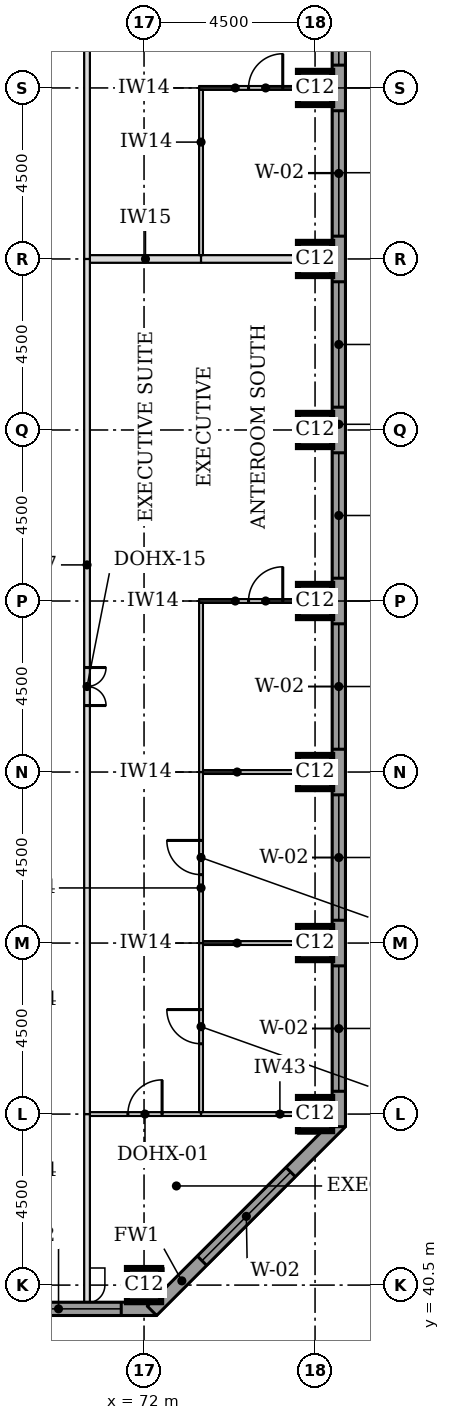
"""IFC4 building model, lengths in metres.
Left out: names, types, materials, properties, quantities, classifications, styles, units other than length and angle.
Written with IfcOpenShell. Run it as: python <this file> out.ifc"""

import sys

from ifc_helpers import new_model, si_unit, direction, frame, frame_2d, origin, origin_2d, place, context, subcontext, project, spatial, rectangle, extrude, element, fill, save


model = new_model("IFC4")
c1 = context("Model", 3, precision=1e-05, world=origin(), true_north=direction((0.0, 1.0)))
c2 = subcontext(c1, "Body", "Model", "MODEL_VIEW")
j1 = project(units=[si_unit("LENGTHUNIT", "METRE"), si_unit("PLANEANGLEUNIT", "RADIAN")], contexts=[c1])
p1 = place(None, origin())
s1 = spatial("IfcSite", under=j1, at=p1, CompositionType="ELEMENT")
p2 = place(p1, origin())
s2 = spatial("IfcBuilding", under=s1, at=p2, CompositionType="ELEMENT")
p3 = place(p2, frame((0.0, 0.0, 256.3)))
s3 = spatial("IfcBuildingStorey", under=s2, at=p3, CompositionType="ELEMENT", Elevation=256.3)
for number, where, z_axis, x_axis in (
    (1, (72.0, 40.5, 0.0), (0.0, 0.0, 1.0), (1.0, 0.0, 0.0)),
    (2, (76.5, 45.0, 0.0), (0.0, 0.0, 1.0), (1.0, 0.0, 0.0)),
    (3, (76.5, 49.5, 0.0), (0.0, 0.0, 1.0), (1.0, 0.0, 0.0)),
    (4, (76.5, 54.0, 0.0), (0.0, 0.0, 1.0), (1.0, 0.0, 0.0)),
    (5, (76.5, 58.5, 0.0), (0.0, 0.0, 1.0), (1.0, 0.0, 0.0)),
    (6, (76.5, 63.0, 0.0), (0.0, 0.0, 1.0), (1.0, 0.0, 0.0)),
    (7, (76.5, 67.5, 0.0), (0.0, 0.0, 1.0), (1.0, 0.0, 0.0)),
    (8, (76.5, 72.0, 0.0), (0.0, 0.0, 1.0), (1.0, 0.0, 0.0)),
):
    element("IfcColumn", number, at=place(p3, frame(where, z_axis=z_axis, x_axis=x_axis)), inside=s3, PredefinedType="COLUMN", context=c2, shape_type="SweptSolid", body=[
        extrude(rectangle(XDim=0.9, YDim=0.9, at=origin_2d()), origin(), (0.0, 0.0, 1.0), 3.7),
    ])
p4 = place(p3, frame((36.0, 39.875, 0.0), z_axis=(0.0, 0.0, 1.0), x_axis=(1.0, 0.0, 0.0)))
e9 = element("IfcWall", 9, at=p4, inside=s3, PredefinedType="STANDARD", context=c2, shape_type="SweptSolid", body=[
    extrude(rectangle(XDim=36.331, YDim=0.35, at=frame_2d((18.166, 0.0))), origin(), (0.0, 0.0, 1.0), 3.525),
])
p5 = place(p4, frame((0.6, 0.0, 0.9)))
e10 = element("IfcOpeningElement", 10, at=p5, cuts=e9, PredefinedType="OPENING", context=c2, shape_type="SweptSolid", body=[
    extrude(rectangle(XDim=3.3, YDim=1.9, at=frame_2d((1.65, 0.95))), frame((0.0, 0.185, 0.0), z_axis=(0.0, -1.0, 0.0), x_axis=(1.0, 0.0, 0.0)), (0.0, 0.0, 1.0), 0.37),
])
p6 = place(p4, frame((5.1, 0.0, 0.9)))
e11 = element("IfcOpeningElement", 11, at=p6, cuts=e9, PredefinedType="OPENING", context=c2, shape_type="SweptSolid", body=[
    extrude(rectangle(XDim=3.3, YDim=1.9, at=frame_2d((1.65, 0.95))), frame((0.0, 0.185, 0.0), z_axis=(0.0, -1.0, 0.0), x_axis=(1.0, 0.0, 0.0)), (0.0, 0.0, 1.0), 0.37),
])
p7 = place(p4, frame((9.6, 0.0, 0.9)))
e12 = element("IfcOpeningElement", 12, at=p7, cuts=e9, PredefinedType="OPENING", context=c2, shape_type="SweptSolid", body=[
    extrude(rectangle(XDim=3.3, YDim=1.9, at=frame_2d((1.65, 0.95))), frame((0.0, 0.185, 0.0), z_axis=(0.0, -1.0, 0.0), x_axis=(1.0, 0.0, 0.0)), (0.0, 0.0, 1.0), 0.37),
])
p8 = place(p4, frame((14.1, 0.0, 0.9)))
e13 = element("IfcOpeningElement", 13, at=p8, cuts=e9, PredefinedType="OPENING", context=c2, shape_type="SweptSolid", body=[
    extrude(rectangle(XDim=3.3, YDim=1.9, at=frame_2d((1.65, 0.95))), frame((0.0, 0.185, 0.0), z_axis=(0.0, -1.0, 0.0), x_axis=(1.0, 0.0, 0.0)), (0.0, 0.0, 1.0), 0.37),
])
p9 = place(p4, frame((18.6, 0.0, 0.9)))
e14 = element("IfcOpeningElement", 14, at=p9, cuts=e9, PredefinedType="OPENING", context=c2, shape_type="SweptSolid", body=[
    extrude(rectangle(XDim=3.3, YDim=1.9, at=frame_2d((1.65, 0.95))), frame((0.0, 0.185, 0.0), z_axis=(0.0, -1.0, 0.0), x_axis=(1.0, 0.0, 0.0)), (0.0, 0.0, 1.0), 0.37),
])
p10 = place(p4, frame((23.1, 0.0, 0.9)))
e15 = element("IfcOpeningElement", 15, at=p10, cuts=e9, PredefinedType="OPENING", context=c2, shape_type="SweptSolid", body=[
    extrude(rectangle(XDim=3.3, YDim=1.9, at=frame_2d((1.65, 0.95))), frame((0.0, 0.185, 0.0), z_axis=(0.0, -1.0, 0.0), x_axis=(1.0, 0.0, 0.0)), (0.0, 0.0, 1.0), 0.37),
])
p11 = place(p4, frame((27.6, 0.0, 0.9)))
e16 = element("IfcOpeningElement", 16, at=p11, cuts=e9, PredefinedType="OPENING", context=c2, shape_type="SweptSolid", body=[
    extrude(rectangle(XDim=3.3, YDim=1.9, at=frame_2d((1.65, 0.95))), frame((0.0, 0.185, 0.0), z_axis=(0.0, -1.0, 0.0), x_axis=(1.0, 0.0, 0.0)), (0.0, 0.0, 1.0), 0.37),
])
p12 = place(p4, frame((32.1, 0.0, 0.9)))
e17 = element("IfcOpeningElement", 17, at=p12, cuts=e9, PredefinedType="OPENING", context=c2, shape_type="SweptSolid", body=[
    extrude(rectangle(XDim=3.3, YDim=1.9, at=frame_2d((1.65, 0.95))), frame((0.0, 0.185, 0.0), z_axis=(0.0, -1.0, 0.0), x_axis=(1.0, 0.0, 0.0)), (0.0, 0.0, 1.0), 0.37),
])
p13 = place(p3, frame((72.208, 39.824, 0.0), z_axis=(0.0, 0.0, 1.0), x_axis=(0.707106781187, 0.707106781187, 0.0)))
e18 = element("IfcWall", 18, at=p13, inside=s3, PredefinedType="STANDARD", context=c2, shape_type="SweptSolid", body=[
    extrude(rectangle(XDim=7.027, YDim=0.35, at=frame_2d((3.513, 0.0))), origin(), (0.0, 0.0, 1.0), 3.525),
])
p14 = place(p13, frame((1.863, 0.0, 0.9)))
e19 = element("IfcOpeningElement", 19, at=p14, cuts=e18, PredefinedType="OPENING", context=c2, shape_type="SweptSolid", body=[
    extrude(rectangle(XDim=3.3, YDim=1.9, at=frame_2d((1.65, 0.95))), frame((0.0, 0.185, 0.0), z_axis=(0.0, -1.0, 0.0), x_axis=(1.0, 0.0, 0.0)), (0.0, 0.0, 1.0), 0.37),
])
p15 = place(p3, frame((77.125, 44.669, 0.0), z_axis=(0.0, 0.0, 1.0), x_axis=(0.0, 1.0, 0.0)))
e20 = element("IfcWall", 20, at=p15, inside=s3, PredefinedType="STANDARD", context=c2, shape_type="SweptSolid", body=[
    extrude(rectangle(XDim=32.163, YDim=0.35, at=frame_2d((16.081, 0.0))), origin(), (0.0, 0.0, 1.0), 3.525),
])
p16 = place(p15, frame((0.931, 0.0, 0.9)))
e21 = element("IfcOpeningElement", 21, at=p16, cuts=e20, PredefinedType="OPENING", context=c2, shape_type="SweptSolid", body=[
    extrude(rectangle(XDim=3.3, YDim=1.9, at=frame_2d((1.65, 0.95))), frame((0.0, 0.185, 0.0), z_axis=(0.0, -1.0, 0.0), x_axis=(1.0, 0.0, 0.0)), (0.0, 0.0, 1.0), 0.37),
])
p17 = place(p15, frame((5.431, 0.0, 0.9)))
e22 = element("IfcOpeningElement", 22, at=p17, cuts=e20, PredefinedType="OPENING", context=c2, shape_type="SweptSolid", body=[
    extrude(rectangle(XDim=3.3, YDim=1.9, at=frame_2d((1.65, 0.95))), frame((0.0, 0.185, 0.0), z_axis=(0.0, -1.0, 0.0), x_axis=(1.0, 0.0, 0.0)), (0.0, 0.0, 1.0), 0.37),
])
p18 = place(p15, frame((9.931, 0.0, 0.9)))
e23 = element("IfcOpeningElement", 23, at=p18, cuts=e20, PredefinedType="OPENING", context=c2, shape_type="SweptSolid", body=[
    extrude(rectangle(XDim=3.3, YDim=1.9, at=frame_2d((1.65, 0.95))), frame((0.0, 0.185, 0.0), z_axis=(0.0, -1.0, 0.0), x_axis=(1.0, 0.0, 0.0)), (0.0, 0.0, 1.0), 0.37),
])
p19 = place(p15, frame((14.431, 0.0, 0.9)))
e24 = element("IfcOpeningElement", 24, at=p19, cuts=e20, PredefinedType="OPENING", context=c2, shape_type="SweptSolid", body=[
    extrude(rectangle(XDim=3.3, YDim=1.9, at=frame_2d((1.65, 0.95))), frame((0.0, 0.185, 0.0), z_axis=(0.0, -1.0, 0.0), x_axis=(1.0, 0.0, 0.0)), (0.0, 0.0, 1.0), 0.37),
])
p20 = place(p15, frame((18.931, 0.0, 0.9)))
e25 = element("IfcOpeningElement", 25, at=p20, cuts=e20, PredefinedType="OPENING", context=c2, shape_type="SweptSolid", body=[
    extrude(rectangle(XDim=3.3, YDim=1.9, at=frame_2d((1.65, 0.95))), frame((0.0, 0.185, 0.0), z_axis=(0.0, -1.0, 0.0), x_axis=(1.0, 0.0, 0.0)), (0.0, 0.0, 1.0), 0.37),
])
p21 = place(p15, frame((23.431, 0.0, 0.9)))
e26 = element("IfcOpeningElement", 26, at=p21, cuts=e20, PredefinedType="OPENING", context=c2, shape_type="SweptSolid", body=[
    extrude(rectangle(XDim=3.3, YDim=1.9, at=frame_2d((1.65, 0.95))), frame((0.0, 0.185, 0.0), z_axis=(0.0, -1.0, 0.0), x_axis=(1.0, 0.0, 0.0)), (0.0, 0.0, 1.0), 0.37),
])
p22 = place(p15, frame((27.931, 0.0, 0.9)))
e27 = element("IfcOpeningElement", 27, at=p22, cuts=e20, PredefinedType="OPENING", context=c2, shape_type="SweptSolid", body=[
    extrude(rectangle(XDim=3.3, YDim=1.9, at=frame_2d((1.65, 0.95))), frame((0.0, 0.185, 0.0), z_axis=(0.0, -1.0, 0.0), x_axis=(1.0, 0.0, 0.0)), (0.0, 0.0, 1.0), 0.37),
])
p23 = place(p3, frame((70.575, 45.0, 0.0), z_axis=(0.0, 0.0, 1.0), x_axis=(1.0, 0.0, 0.0)))
e28 = element("IfcWall", 28, at=p23, inside=s3, PredefinedType="PARTITIONING", context=c2, shape_type="SweptSolid", body=[
    extrude(rectangle(XDim=2.925, YDim=0.1, at=frame_2d((1.462, 0.0))), origin(), (0.0, 0.0, 1.0), 3.096),
])
p24 = place(p23, frame((1.0, 0.0, 0.0)))
e29 = element("IfcOpeningElement", 29, at=p24, cuts=e28, PredefinedType="OPENING", context=c2, shape_type="SweptSolid", body=[
    extrude(rectangle(XDim=0.9, YDim=2.1, at=frame_2d((0.45, 1.05))), frame((0.0, 0.06, 0.0), z_axis=(0.0, -1.0, 0.0), x_axis=(1.0, 0.0, 0.0)), (0.0, 0.0, 1.0), 0.12),
])
p25 = place(p3, frame((73.5, 45.0, 0.0), z_axis=(0.0, 0.0, 1.0), x_axis=(1.0, 0.0, 0.0)))
e30 = element("IfcWall", 30, at=p25, inside=s3, PredefinedType="PARTITIONING", context=c2, shape_type="SweptSolid", body=[
    extrude(rectangle(XDim=2.55, YDim=0.1, at=frame_2d((1.275, 0.0))), origin(), (0.0, 0.0, 1.0), 3.096),
])
for number, where, z_axis, x_axis in (
    (31, (73.55, 49.5, 0.0), (0.0, 0.0, 1.0), (1.0, 0.0, 0.0)),
    (32, (73.55, 54.0, 0.0), (0.0, 0.0, 1.0), (1.0, 0.0, 0.0)),
):
    element("IfcWall", number, at=place(p3, frame(where, z_axis=z_axis, x_axis=x_axis)), inside=s3, PredefinedType="PARTITIONING", context=c2, shape_type="SweptSolid", body=[
        extrude(rectangle(XDim=3.4, YDim=0.1, at=frame_2d((1.7, 0.0))), origin(), (0.0, 0.0, 1.0), 3.55),
    ])
p26 = place(p3, frame((73.45, 58.5, 0.0), z_axis=(0.0, 0.0, 1.0), x_axis=(1.0, 0.0, 0.0)))
e33 = element("IfcWall", 33, at=p26, inside=s3, PredefinedType="PARTITIONING", context=c2, shape_type="SweptSolid", body=[
    extrude(rectangle(XDim=3.5, YDim=0.1, at=frame_2d((1.75, 0.0))), origin(), (0.0, 0.0, 1.0), 3.55),
])
p27 = place(p26, frame((1.3, 0.0, 0.0)))
e34 = element("IfcOpeningElement", 34, at=p27, cuts=e33, PredefinedType="OPENING", context=c2, shape_type="SweptSolid", body=[
    extrude(rectangle(XDim=0.9, YDim=2.1, at=frame_2d((0.45, 1.05))), frame((0.0, 0.06, 0.0), z_axis=(0.0, -1.0, 0.0), x_axis=(1.0, 0.0, 0.0)), (0.0, 0.0, 1.0), 0.12),
])
p28 = place(p3, frame((70.575, 67.5, 0.0), z_axis=(0.0, 0.0, 1.0), x_axis=(1.0, 0.0, 0.0)))
e35 = element("IfcWall", 35, at=p28, inside=s3, PredefinedType="PARTITIONING", context=c2, shape_type="SweptSolid", body=[
    extrude(rectangle(XDim=2.925, YDim=0.2, at=frame_2d((1.462, 0.0))), origin(), (0.0, 0.0, 1.0), 3.55),
])
p29 = place(p3, frame((73.5, 67.5, 0.0), z_axis=(0.0, 0.0, 1.0), x_axis=(1.0, 0.0, 0.0)))
e36 = element("IfcWall", 36, at=p29, inside=s3, PredefinedType="PARTITIONING", context=c2, shape_type="SweptSolid", body=[
    extrude(rectangle(XDim=3.45, YDim=0.2, at=frame_2d((1.725, 0.0))), origin(), (0.0, 0.0, 1.0), 3.55),
])
p30 = place(p3, frame((73.45, 72.0, 0.0), z_axis=(0.0, 0.0, 1.0), x_axis=(1.0, 0.0, 0.0)))
e37 = element("IfcWall", 37, at=p30, inside=s3, PredefinedType="PARTITIONING", context=c2, shape_type="SweptSolid", body=[
    extrude(rectangle(XDim=3.5, YDim=0.1, at=frame_2d((1.75, 0.0))), origin(), (0.0, 0.0, 1.0), 3.55),
])
p31 = place(p30, frame((1.3, 0.0, 0.0)))
e38 = element("IfcOpeningElement", 38, at=p31, cuts=e37, PredefinedType="OPENING", context=c2, shape_type="SweptSolid", body=[
    extrude(rectangle(XDim=0.9, YDim=2.1, at=frame_2d((0.45, 1.05))), frame((0.0, 0.06, 0.0), z_axis=(0.0, -1.0, 0.0), x_axis=(1.0, 0.0, 0.0)), (0.0, 0.0, 1.0), 0.12),
])
p32 = place(p3, frame((70.5, 40.05, 0.0), z_axis=(0.0, 0.0, 1.0), x_axis=(0.0, 1.0, 0.0)))
e39 = element("IfcWall", 39, at=p32, inside=s3, PredefinedType="PARTITIONING", context=c2, shape_type="SweptSolid", body=[
    extrude(rectangle(XDim=4.95, YDim=0.15, at=frame_2d((2.475, 0.0))), origin(), (0.0, 0.0, 1.0), 3.55),
])
p33 = place(p3, frame((70.5, 45.0, 0.0), z_axis=(0.0, 0.0, 1.0), x_axis=(0.0, 1.0, 0.0)))
e40 = element("IfcWall", 40, at=p33, inside=s3, PredefinedType="PARTITIONING", context=c2, shape_type="SweptSolid", body=[
    extrude(rectangle(XDim=22.5, YDim=0.15, at=frame_2d((11.25, 0.0))), origin(), (0.0, 0.0, 1.0), 3.55),
])
p34 = place(p33, frame((10.75, 0.0, 0.0)))
e41 = element("IfcOpeningElement", 41, at=p34, cuts=e40, PredefinedType="OPENING", context=c2, shape_type="SweptSolid", body=[
    extrude(rectangle(XDim=1.0, YDim=2.1, at=frame_2d((0.5, 1.05))), frame((0.0, 0.085, 0.0), z_axis=(0.0, -1.0, 0.0), x_axis=(1.0, 0.0, 0.0)), (0.0, 0.0, 1.0), 0.17),
])
p35 = place(p3, frame((73.5, 45.05, 0.0), z_axis=(0.0, 0.0, 1.0), x_axis=(0.0, 1.0, 0.0)))
e42 = element("IfcWall", 42, at=p35, inside=s3, PredefinedType="PARTITIONING", context=c2, shape_type="SweptSolid", body=[
    extrude(rectangle(XDim=4.45, YDim=0.1, at=frame_2d((2.225, 0.0))), origin(), (0.0, 0.0, 1.0), 3.55),
])
p36 = place(p35, frame((1.8, 0.0, 0.0)))
e43 = element("IfcOpeningElement", 43, at=p36, cuts=e42, PredefinedType="OPENING", context=c2, shape_type="SweptSolid", body=[
    extrude(rectangle(XDim=0.9, YDim=2.1, at=frame_2d((0.45, 1.05))), frame((0.0, 0.06, 0.0), z_axis=(0.0, -1.0, 0.0), x_axis=(1.0, 0.0, 0.0)), (0.0, 0.0, 1.0), 0.12),
])
p37 = place(p3, frame((73.5, 49.5, 0.0), z_axis=(0.0, 0.0, 1.0), x_axis=(0.0, 1.0, 0.0)))
e44 = element("IfcWall", 44, at=p37, inside=s3, PredefinedType="PARTITIONING", context=c2, shape_type="SweptSolid", body=[
    extrude(rectangle(XDim=4.5, YDim=0.1, at=frame_2d((2.25, 0.0))), origin(), (0.0, 0.0, 1.0), 3.55),
])
p38 = place(p37, frame((1.8, 0.0, 0.0)))
e45 = element("IfcOpeningElement", 45, at=p38, cuts=e44, PredefinedType="OPENING", context=c2, shape_type="SweptSolid", body=[
    extrude(rectangle(XDim=0.9, YDim=2.1, at=frame_2d((0.45, 1.05))), frame((0.0, 0.06, 0.0), z_axis=(0.0, -1.0, 0.0), x_axis=(1.0, 0.0, 0.0)), (0.0, 0.0, 1.0), 0.12),
])
p39 = place(p3, frame((73.5, 54.0, 0.0), z_axis=(0.0, 0.0, 1.0), x_axis=(0.0, 1.0, 0.0)))
e46 = element("IfcWall", 46, at=p39, inside=s3, PredefinedType="PARTITIONING", context=c2, shape_type="SweptSolid", body=[
    extrude(rectangle(XDim=4.45, YDim=0.1, at=frame_2d((2.225, 0.0))), origin(), (0.0, 0.0, 1.0), 3.55),
])
p40 = place(p3, frame((70.5, 67.5, 0.0), z_axis=(0.0, 0.0, 1.0), x_axis=(0.0, 1.0, 0.0)))
e47 = element("IfcWall", 47, at=p40, inside=s3, PredefinedType="PARTITIONING", context=c2, shape_type="SweptSolid", body=[
    extrude(rectangle(XDim=13.95, YDim=0.15, at=frame_2d((6.975, 0.0))), origin(), (0.0, 0.0, 1.0), 3.55),
])
p41 = place(p40, frame((6.5, 0.0, 0.0)))
e48 = element("IfcOpeningElement", 48, at=p41, cuts=e47, PredefinedType="OPENING", context=c2, shape_type="SweptSolid", body=[
    extrude(rectangle(XDim=1.0, YDim=2.1, at=frame_2d((0.5, 1.05))), frame((0.0, 0.085, 0.0), z_axis=(0.0, -1.0, 0.0), x_axis=(1.0, 0.0, 0.0)), (0.0, 0.0, 1.0), 0.17),
])
p42 = place(p3, frame((73.5, 67.6, 0.0), z_axis=(0.0, 0.0, 1.0), x_axis=(0.0, 1.0, 0.0)))
e49 = element("IfcWall", 49, at=p42, inside=s3, PredefinedType="PARTITIONING", context=c2, shape_type="SweptSolid", body=[
    extrude(rectangle(XDim=4.35, YDim=0.1, at=frame_2d((2.175, 0.0))), origin(), (0.0, 0.0, 1.0), 3.55),
])
p43 = place(p12, origin())
e50 = element("IfcWindow", 50, at=p43, inside=s3, PartitioningType="SINGLE_PANEL", PredefinedType="WINDOW", context=c2, shape_type="SweptSolid", body=[
    extrude(rectangle(XDim=3.3, YDim=1.9, at=frame_2d((1.65, 0.95))), frame((0.0, 0.085, 0.0), z_axis=(0.0, -1.0, 0.0), x_axis=(1.0, 0.0, 0.0)), (0.0, 0.0, 1.0), 0.06),
])
fill(e17, e50)
p44 = place(p14, origin())
e51 = element("IfcWindow", 51, at=p44, inside=s3, PartitioningType="SINGLE_PANEL", PredefinedType="WINDOW", context=c2, shape_type="SweptSolid", body=[
    extrude(rectangle(XDim=3.3, YDim=1.9, at=frame_2d((1.65, 0.95))), frame((0.0, 0.085, 0.0), z_axis=(0.0, -1.0, 0.0), x_axis=(1.0, 0.0, 0.0)), (0.0, 0.0, 1.0), 0.06),
])
fill(e19, e51)
p45 = place(p16, origin())
e52 = element("IfcWindow", 52, at=p45, inside=s3, PartitioningType="SINGLE_PANEL", PredefinedType="WINDOW", context=c2, shape_type="SweptSolid", body=[
    extrude(rectangle(XDim=3.3, YDim=1.9, at=frame_2d((1.65, 0.95))), frame((0.0, 0.085, 0.0), z_axis=(0.0, -1.0, 0.0), x_axis=(1.0, 0.0, 0.0)), (0.0, 0.0, 1.0), 0.06),
])
fill(e21, e52)
p46 = place(p17, origin())
e53 = element("IfcWindow", 53, at=p46, inside=s3, PartitioningType="SINGLE_PANEL", PredefinedType="WINDOW", context=c2, shape_type="SweptSolid", body=[
    extrude(rectangle(XDim=3.3, YDim=1.9, at=frame_2d((1.65, 0.95))), frame((0.0, 0.085, 0.0), z_axis=(0.0, -1.0, 0.0), x_axis=(1.0, 0.0, 0.0)), (0.0, 0.0, 1.0), 0.06),
])
fill(e22, e53)
p47 = place(p18, origin())
e54 = element("IfcWindow", 54, at=p47, inside=s3, PartitioningType="SINGLE_PANEL", PredefinedType="WINDOW", context=c2, shape_type="SweptSolid", body=[
    extrude(rectangle(XDim=3.3, YDim=1.9, at=frame_2d((1.65, 0.95))), frame((0.0, 0.085, 0.0), z_axis=(0.0, -1.0, 0.0), x_axis=(1.0, 0.0, 0.0)), (0.0, 0.0, 1.0), 0.06),
])
fill(e23, e54)
p48 = place(p19, origin())
e55 = element("IfcWindow", 55, at=p48, inside=s3, PartitioningType="SINGLE_PANEL", PredefinedType="WINDOW", context=c2, shape_type="SweptSolid", body=[
    extrude(rectangle(XDim=3.3, YDim=1.9, at=frame_2d((1.65, 0.95))), frame((0.0, 0.085, 0.0), z_axis=(0.0, -1.0, 0.0), x_axis=(1.0, 0.0, 0.0)), (0.0, 0.0, 1.0), 0.06),
])
fill(e24, e55)
p49 = place(p20, origin())
e56 = element("IfcWindow", 56, at=p49, inside=s3, PartitioningType="SINGLE_PANEL", PredefinedType="WINDOW", context=c2, shape_type="SweptSolid", body=[
    extrude(rectangle(XDim=3.3, YDim=1.9, at=frame_2d((1.65, 0.95))), frame((0.0, 0.085, 0.0), z_axis=(0.0, -1.0, 0.0), x_axis=(1.0, 0.0, 0.0)), (0.0, 0.0, 1.0), 0.06),
])
fill(e25, e56)
p50 = place(p21, origin())
e57 = element("IfcWindow", 57, at=p50, inside=s3, PartitioningType="SINGLE_PANEL", PredefinedType="WINDOW", context=c2, shape_type="SweptSolid", body=[
    extrude(rectangle(XDim=3.3, YDim=1.9, at=frame_2d((1.65, 0.95))), frame((0.0, 0.085, 0.0), z_axis=(0.0, -1.0, 0.0), x_axis=(1.0, 0.0, 0.0)), (0.0, 0.0, 1.0), 0.06),
])
fill(e26, e57)
p51 = place(p22, origin())
e58 = element("IfcWindow", 58, at=p51, inside=s3, PartitioningType="SINGLE_PANEL", PredefinedType="WINDOW", context=c2, shape_type="SweptSolid", body=[
    extrude(rectangle(XDim=3.3, YDim=1.9, at=frame_2d((1.65, 0.95))), frame((0.0, 0.085, 0.0), z_axis=(0.0, -1.0, 0.0), x_axis=(1.0, 0.0, 0.0)), (0.0, 0.0, 1.0), 0.06),
])
fill(e27, e58)
p52 = place(p34, frame((1.0, 0.0, 0.0), z_axis=(0.0, 0.0, 1.0), x_axis=(-1.0, 0.0, 0.0)))
e59 = element("IfcDoor", 59, at=p52, inside=s3, OperationType="DOUBLE_DOOR_SINGLE_SWING", PredefinedType="DOOR", context=c2, shape_type="SweptSolid", body=[
    extrude(rectangle(XDim=1.0, YDim=2.1, at=frame_2d((0.5, 1.05))), frame((0.0, 0.025, 0.0), z_axis=(0.0, -1.0, 0.0), x_axis=(1.0, 0.0, 0.0)), (0.0, 0.0, 1.0), 0.05),
])
fill(e41, e59)
p53 = place(p24, origin())
e60 = element("IfcDoor", 60, at=p53, inside=s3, OperationType="SINGLE_SWING_RIGHT", PredefinedType="DOOR", context=c2, shape_type="SweptSolid", body=[
    extrude(rectangle(XDim=0.9, YDim=2.1, at=frame_2d((0.45, 1.05))), frame((0.0, 0.025, 0.0), z_axis=(0.0, -1.0, 0.0), x_axis=(1.0, 0.0, 0.0)), (0.0, 0.0, 1.0), 0.05),
])
fill(e29, e60)
p54 = place(p36, origin())
e61 = element("IfcDoor", 61, at=p54, inside=s3, OperationType="SINGLE_SWING_RIGHT", PredefinedType="DOOR", context=c2, shape_type="SweptSolid", body=[
    extrude(rectangle(XDim=0.9, YDim=2.1, at=frame_2d((0.45, 1.05))), frame((0.0, 0.025, 0.0), z_axis=(0.0, -1.0, 0.0), x_axis=(1.0, 0.0, 0.0)), (0.0, 0.0, 1.0), 0.05),
])
fill(e43, e61)
p55 = place(p38, origin())
e62 = element("IfcDoor", 62, at=p55, inside=s3, OperationType="SINGLE_SWING_RIGHT", PredefinedType="DOOR", context=c2, shape_type="SweptSolid", body=[
    extrude(rectangle(XDim=0.9, YDim=2.1, at=frame_2d((0.45, 1.05))), frame((0.0, 0.025, 0.0), z_axis=(0.0, -1.0, 0.0), x_axis=(1.0, 0.0, 0.0)), (0.0, 0.0, 1.0), 0.05),
])
fill(e45, e62)
p56 = place(p27, origin())
e63 = element("IfcDoor", 63, at=p56, inside=s3, OperationType="SINGLE_SWING_RIGHT", PredefinedType="DOOR", context=c2, shape_type="SweptSolid", body=[
    extrude(rectangle(XDim=0.9, YDim=2.1, at=frame_2d((0.45, 1.05))), frame((0.0, 0.025, 0.0), z_axis=(0.0, -1.0, 0.0), x_axis=(1.0, 0.0, 0.0)), (0.0, 0.0, 1.0), 0.05),
])
fill(e34, e63)
p57 = place(p31, origin())
e64 = element("IfcDoor", 64, at=p57, inside=s3, OperationType="SINGLE_SWING_RIGHT", PredefinedType="DOOR", context=c2, shape_type="SweptSolid", body=[
    extrude(rectangle(XDim=0.9, YDim=2.1, at=frame_2d((0.45, 1.05))), frame((0.0, 0.025, 0.0), z_axis=(0.0, -1.0, 0.0), x_axis=(1.0, 0.0, 0.0)), (0.0, 0.0, 1.0), 0.05),
])
fill(e38, e64)
save(model, sys.argv[1])
